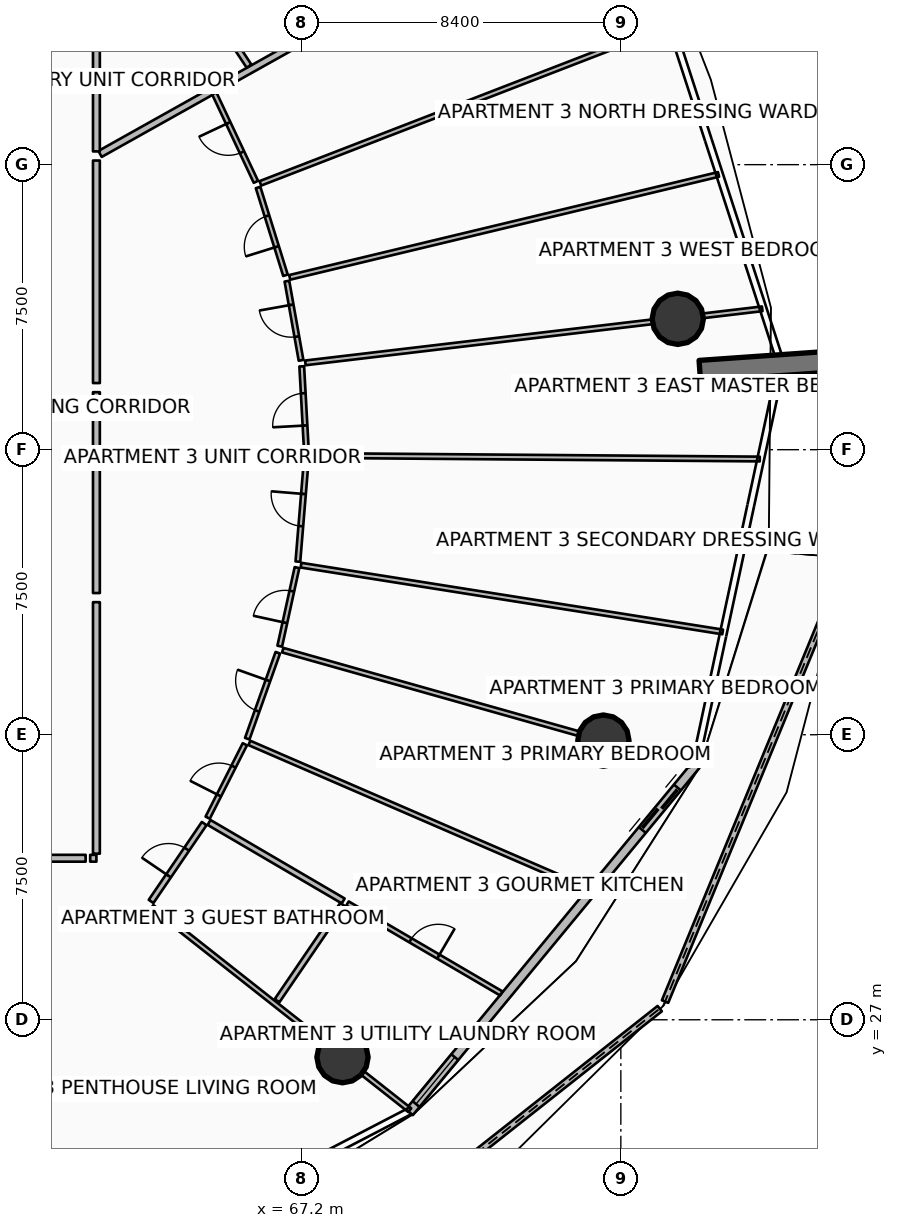
"""IFC4 building model, lengths in metres.
Left out: names, types, materials, properties, quantities, classifications, styles, units other than length and angle.
Written with IfcOpenShell. Run it as: python <this file> out.ifc"""

import sys

from ifc_helpers import new_model, si_unit, direction, frame, frame_2d, origin, origin_2d, place, context, subcontext, project, spatial, polyline, rectangle, circle, outline, extrude, element, fill, save


model = new_model("IFC4")
c1 = context("Model", 3, precision=1e-05, world=origin(), true_north=direction((0.0, 1.0)))
c2 = subcontext(c1, "Body", "Model", "MODEL_VIEW")
j1 = project(units=[si_unit("LENGTHUNIT", "METRE"), si_unit("PLANEANGLEUNIT", "RADIAN")], contexts=[c1])
p1 = place(None, origin())
s1 = spatial("IfcSite", under=j1, at=p1, CompositionType="ELEMENT")
p2 = place(p1, origin())
s2 = spatial("IfcBuilding", under=s1, at=p2, CompositionType="ELEMENT")
p3 = place(p2, frame((0.0, 0.0, 63.9)))
s3 = spatial("IfcBuildingStorey", under=s2, at=p3, CompositionType="ELEMENT", Elevation=63.9)
p4 = place(p3, frame((77.678, 44.075, 0.0), z_axis=(0.0, 0.0, 1.0), x_axis=(0.997564163539, 0.069754853754, 0.0)))
e1 = element("IfcWall", 1, at=p4, inside=s3, PredefinedType="SOLIDWALL", context=c2, shape_type="SweptSolid", body=[
    extrude(rectangle(XDim=3.5, YDim=0.55, at=frame_2d((1.75, 0.0))), origin(), (0.0, 0.0, 1.0), 3.75),
])
for number, where, z_axis, x_axis in (
    (2, (68.276, 26.016, 0.0), (0.0, 0.0, 1.0), (1.0, 0.0, 0.0)),
    (3, (75.141, 34.345, 0.0), (0.0, 0.0, 1.0), (1.0, 0.0, 0.0)),
    (4, (77.098, 45.444, 0.0), (0.0, 0.0, 1.0), (1.0, 0.0, 0.0)),
):
    element("IfcColumn", number, at=place(p3, frame(where, z_axis=z_axis, x_axis=x_axis)), inside=s3, PredefinedType="COLUMN", context=c2, shape_type="SweptSolid", body=[
        extrude(circle(Radius=0.675, at=origin_2d()), origin(), (0.0, 0.0, 1.0), 3.5),
    ])
p5 = place(p3, frame((67.172, 19.829, 0.0), z_axis=(0.0, 0.0, 1.0), x_axis=(0.784771193171, 0.619785587416, 0.0)))
e5 = element("IfcWall", 5, at=p5, inside=s3, PredefinedType="PARAPET", context=c2, shape_type="SweptSolid", body=[
    extrude(outline(polyline([(0.0, 0.0), (12.044, 0.0), (12.044, 1.832), (6.022, 1.853), (0.0, 1.756), (0.0, 0.0)])), frame((0.0, 0.09, 0.0), z_axis=(0.0, -1.0, 0.0), x_axis=(1.0, 0.0, 0.0)), (0.0, 0.0, 1.0), 0.18),
])
p6 = place(p3, frame((76.763, 27.479, 0.0), z_axis=(0.0, 0.0, 1.0), x_axis=(0.381082407016, 0.924541074838, 0.0)))
e6 = element("IfcWall", 6, at=p6, inside=s3, PredefinedType="PARAPET", context=c2, shape_type="SweptSolid", body=[
    extrude(outline(polyline([(0.0, 0.0), (12.625, 0.0), (12.625, 1.497), (6.312, 1.696), (0.0, 1.832), (0.0, 0.0)])), frame((0.0, 0.09, 0.0), z_axis=(0.0, -1.0, 0.0), x_axis=(1.0, 0.0, 0.0)), (0.0, 0.0, 1.0), 0.18),
])
p7 = place(p3, frame((70.033, 24.567, 0.0), z_axis=(0.0, 0.0, 1.0), x_axis=(0.636674332663, 0.771132799281, 0.0)))
e7 = element("IfcWall", 7, at=p7, inside=s3, PredefinedType="SOLIDWALL", context=c2, shape_type="SweptSolid", body=[
    extrude(rectangle(XDim=11.851, YDim=0.24, at=frame_2d((5.926, 0.0))), origin(), (0.0, 0.0, 1.0), 2.45),
])
p8 = place(p7, frame((9.631, 0.0, 0.0)))
e8 = element("IfcOpeningElement", 8, at=p8, cuts=e7, PredefinedType="OPENING", context=c2, shape_type="SweptSolid", body=[
    extrude(rectangle(XDim=1.45, YDim=2.15, at=frame_2d((0.725, 1.075))), frame((0.0, 0.13, 0.0), z_axis=(0.0, -1.0, 0.0), x_axis=(1.0, 0.0, 0.0)), (0.0, 0.0, 1.0), 0.26),
])
p9 = place(p7, frame((0.28, 0.0, 0.65)))
e9 = element("IfcOpeningElement", 9, at=p9, cuts=e7, PredefinedType="OPENING", context=c2, shape_type="SweptSolid", body=[
    extrude(rectangle(XDim=1.6, YDim=1.5, at=frame_2d((0.8, 0.75))), frame((0.0, 0.13, 0.0), z_axis=(0.0, -1.0, 0.0), x_axis=(1.0, 0.0, 0.0)), (0.0, 0.0, 1.0), 0.26),
])
p10 = place(p3, frame((61.896, 49.782, 0.0), z_axis=(0.0, 0.0, 1.0), x_axis=(0.872493215695, 0.488626225828, 0.0)))
e10 = element("IfcWall", 10, at=p10, inside=s3, PredefinedType="PARTITIONING", context=c2, shape_type="SweptSolid", body=[
    extrude(rectangle(XDim=15.612, YDim=0.18, at=frame_2d((7.806, 0.0))), origin(), (0.0, 0.0, 1.0), 2.867),
])
p11 = place(p3, frame((54.14, 31.25, 0.0), z_axis=(0.0, 0.0, 1.0), x_axis=(1.0, 0.0, 0.0)))
e11 = element("IfcWall", 11, at=p11, inside=s3, PredefinedType="PARTITIONING", context=c2, shape_type="SweptSolid", body=[
    extrude(rectangle(XDim=7.376, YDim=0.18, at=frame_2d((3.688, 0.0))), origin(), (0.0, 0.0, 1.0), 2.867),
])
p12 = place(p11, frame((3.138, 0.0, 0.0)))
e12 = element("IfcOpeningElement", 12, at=p12, cuts=e11, PredefinedType="OPENING", context=c2, shape_type="SweptSolid", body=[
    extrude(rectangle(XDim=1.1, YDim=2.1, at=frame_2d((0.55, 1.05))), frame((0.0, 0.1, 0.0), z_axis=(0.0, -1.0, 0.0), x_axis=(1.0, 0.0, 0.0)), (0.0, 0.0, 1.0), 0.2),
])
p13 = place(p3, frame((61.636, 31.25, 0.0), z_axis=(0.0, 0.0, 1.0), x_axis=(1.0, 0.0, 0.0)))
e13 = element("IfcWall", 13, at=p13, inside=s3, PredefinedType="PARTITIONING", context=c2, shape_type="SweptSolid", body=[
    extrude(rectangle(XDim=0.164, YDim=0.18, at=frame_2d((0.082, 0.0))), origin(), (0.0, 0.0, 1.0), 2.867),
])
p14 = place(p3, frame((61.8, 31.37, 0.0), z_axis=(0.0, 0.0, 1.0), x_axis=(0.0, 1.0, 0.0)))
e14 = element("IfcWall", 14, at=p14, inside=s3, PredefinedType="PARTITIONING", context=c2, shape_type="SweptSolid", body=[
    extrude(rectangle(XDim=6.618, YDim=0.18, at=frame_2d((3.309, 0.0))), origin(), (0.0, 0.0, 1.0), 2.867),
])
p15 = place(p3, frame((63.261, 29.969, 0.0), z_axis=(0.0, 0.0, 1.0), x_axis=(0.78531804627, -0.619092534443, 0.0)))
e15 = element("IfcWall", 15, at=p15, inside=s3, PredefinedType="PARTITIONING", context=c2, shape_type="SweptSolid", body=[
    extrude(rectangle(XDim=8.639, YDim=0.125, at=frame_2d((4.32, 0.0))), origin(), (0.0, 0.0, 1.0), 2.867),
])
p16 = place(p3, frame((63.239, 30.114, 0.0), z_axis=(0.0, 0.0, 1.0), x_axis=(0.563437614894, 0.826158613174, 0.0)))
e16 = element("IfcWall", 16, at=p16, inside=s3, PredefinedType="PARTITIONING", context=c2, shape_type="SweptSolid", body=[
    extrude(rectangle(XDim=2.48, YDim=0.15, at=frame_2d((1.24, 0.0))), origin(), (0.0, 0.0, 1.0), 2.867),
])
p17 = place(p16, frame((0.815, 0.0, 0.0)))
e17 = element("IfcOpeningElement", 17, at=p17, cuts=e16, PredefinedType="OPENING", context=c2, shape_type="SweptSolid", body=[
    extrude(rectangle(XDim=0.85, YDim=2.06, at=frame_2d((0.425, 1.03))), frame((0.0, 0.085, 0.0), z_axis=(0.0, -1.0, 0.0), x_axis=(1.0, 0.0, 0.0)), (0.0, 0.0, 1.0), 0.17),
])
p18 = place(p3, frame((66.553, 27.501, 0.0), z_axis=(0.0, 0.0, 1.0), x_axis=(0.563388764178, 0.826191927095, 0.0)))
e18 = element("IfcWall", 18, at=p18, inside=s3, PredefinedType="PARTITIONING", context=c2, shape_type="SweptSolid", body=[
    extrude(rectangle(XDim=3.063, YDim=0.15, at=frame_2d((1.531, 0.0))), origin(), (0.0, 0.0, 1.0), 2.867),
])
p19 = place(p3, frame((64.765, 32.192, 0.0), z_axis=(0.0, 0.0, 1.0), x_axis=(0.863128698129, -0.504984010109, 0.0)))
e19 = element("IfcWall", 19, at=p19, inside=s3, PredefinedType="PARTITIONING", context=c2, shape_type="SweptSolid", body=[
    extrude(rectangle(XDim=4.09, YDim=0.15, at=frame_2d((2.045, 0.0))), origin(), (0.0, 0.0, 1.0), 2.94),
])
p20 = place(p3, frame((68.407, 30.061, 0.0), z_axis=(0.0, 0.0, 1.0), x_axis=(0.863132370473, -0.504977733214, 0.0)))
e20 = element("IfcWall", 20, at=p20, inside=s3, PredefinedType="PARTITIONING", context=c2, shape_type="SweptSolid", body=[
    extrude(rectangle(XDim=4.689, YDim=0.125, at=frame_2d((2.345, 0.0))), origin(), (0.0, 0.0, 1.0), 2.94),
])
p21 = place(p20, frame((1.919, 0.0, 0.0)))
e21 = element("IfcOpeningElement", 21, at=p21, cuts=e20, PredefinedType="OPENING", context=c2, shape_type="SweptSolid", body=[
    extrude(rectangle(XDim=0.85, YDim=2.06, at=frame_2d((0.425, 1.03))), frame((0.0, 0.073, 0.0), z_axis=(0.0, -1.0, 0.0), x_axis=(1.0, 0.0, 0.0)), (0.0, 0.0, 1.0), 0.145),
])
p22 = place(p3, frame((65.825, 34.285, 0.0), z_axis=(0.0, 0.0, 1.0), x_axis=(0.917721842762, -0.39722363892, 0.0)))
e22 = element("IfcWall", 22, at=p22, inside=s3, PredefinedType="PARTITIONING", context=c2, shape_type="SweptSolid", body=[
    extrude(rectangle(XDim=9.694, YDim=0.125, at=frame_2d((4.847, 0.0))), origin(), (0.0, 0.0, 1.0), 2.94),
])
p23 = place(p3, frame((64.728, 32.317, 0.0), z_axis=(0.0, 0.0, 1.0), x_axis=(0.451897802863, 0.892069714634, 0.0)))
e23 = element("IfcWall", 23, at=p23, inside=s3, PredefinedType="PARTITIONING", context=c2, shape_type="SweptSolid", body=[
    extrude(rectangle(XDim=2.165, YDim=0.125, at=frame_2d((1.083, 0.0))), origin(), (0.0, 0.0, 1.0), 2.94),
])
p24 = place(p23, frame((0.658, 0.0, 0.0)))
e24 = element("IfcOpeningElement", 24, at=p24, cuts=e23, PredefinedType="OPENING", context=c2, shape_type="SweptSolid", body=[
    extrude(rectangle(XDim=0.85, YDim=2.06, at=frame_2d((0.425, 1.03))), frame((0.0, 0.073, 0.0), z_axis=(0.0, -1.0, 0.0), x_axis=(1.0, 0.0, 0.0)), (0.0, 0.0, 1.0), 0.145),
])
p25 = place(p3, frame((65.769, 34.396, 0.0), z_axis=(0.0, 0.0, 1.0), x_axis=(0.335079884685, 0.942189721277, 0.0)))
e25 = element("IfcWall", 25, at=p25, inside=s3, PredefinedType="PARTITIONING", context=c2, shape_type="SweptSolid", body=[
    extrude(rectangle(XDim=2.401, YDim=0.125, at=frame_2d((1.2, 0.0))), origin(), (0.0, 0.0, 1.0), 2.867),
])
p26 = place(p25, frame((0.775, 0.0, 0.0)))
e26 = element("IfcOpeningElement", 26, at=p26, cuts=e25, PredefinedType="OPENING", context=c2, shape_type="SweptSolid", body=[
    extrude(rectangle(XDim=0.85, YDim=2.06, at=frame_2d((0.425, 1.03))), frame((0.0, 0.073, 0.0), z_axis=(0.0, -1.0, 0.0), x_axis=(1.0, 0.0, 0.0)), (0.0, 0.0, 1.0), 0.145),
])
p27 = place(p3, frame((61.8, 38.228, 0.0), z_axis=(0.0, 0.0, 1.0), x_axis=(0.0, 1.0, 0.0)))
e27 = element("IfcWall", 27, at=p27, inside=s3, PredefinedType="PARTITIONING", context=c2, shape_type="SweptSolid", body=[
    extrude(rectangle(XDim=5.285, YDim=0.18, at=frame_2d((2.643, 0.0))), origin(), (0.0, 0.0, 1.0), 2.867),
])
p28 = place(p3, frame((66.703, 36.725, 0.0), z_axis=(0.0, 0.0, 1.0), x_axis=(0.962456868727, -0.271434662195, 0.0)))
e28 = element("IfcWall", 28, at=p28, inside=s3, PredefinedType="PARTITIONING", context=c2, shape_type="SweptSolid", body=[
    extrude(rectangle(XDim=11.141, YDim=0.125, at=frame_2d((5.571, 0.0))), origin(), (0.0, 0.0, 1.0), 2.867),
])
p29 = place(p3, frame((67.184, 38.962, 0.0), z_axis=(0.0, 0.0, 1.0), x_axis=(0.987685842404, -0.156450237182, 0.0)))
e29 = element("IfcWall", 29, at=p29, inside=s3, PredefinedType="PARTITIONING", context=c2, shape_type="SweptSolid", body=[
    extrude(rectangle(XDim=11.234, YDim=0.125, at=frame_2d((5.617, 0.0))), origin(), (0.0, 0.0, 1.0), 2.94),
])
p30 = place(p3, frame((67.422, 41.847, 0.0), z_axis=(0.0, 0.0, 1.0), x_axis=(0.999969106173, -0.007860451618, 0.0)))
e30 = element("IfcWall", 30, at=p30, inside=s3, PredefinedType="PARTITIONING", context=c2, shape_type="SweptSolid", body=[
    extrude(rectangle(XDim=11.833, YDim=0.125, at=frame_2d((5.917, 0.0))), origin(), (0.0, 0.0, 1.0), 2.94),
])
p31 = place(p3, frame((66.624, 36.83, 0.0), z_axis=(0.0, 0.0, 1.0), x_axis=(0.214316036982, 0.976764370917, 0.0)))
e31 = element("IfcWall", 31, at=p31, inside=s3, PredefinedType="PARTITIONING", context=c2, shape_type="SweptSolid", body=[
    extrude(rectangle(XDim=2.116, YDim=0.125, at=frame_2d((1.058, 0.0))), origin(), (0.0, 0.0, 1.0), 2.867),
])
p32 = place(p31, frame((0.633, 0.0, 0.0)))
e32 = element("IfcOpeningElement", 32, at=p32, cuts=e31, PredefinedType="OPENING", context=c2, shape_type="SweptSolid", body=[
    extrude(rectangle(XDim=0.85, YDim=2.06, at=frame_2d((0.425, 1.03))), frame((0.0, 0.073, 0.0), z_axis=(0.0, -1.0, 0.0), x_axis=(1.0, 0.0, 0.0)), (0.0, 0.0, 1.0), 0.145),
])
p33 = place(p3, frame((67.102, 39.055, 0.0), z_axis=(0.0, 0.0, 1.0), x_axis=(0.082325550285, 0.996605490538, 0.0)))
e33 = element("IfcWall", 33, at=p33, inside=s3, PredefinedType="PARTITIONING", context=c2, shape_type="SweptSolid", body=[
    extrude(rectangle(XDim=2.722, YDim=0.125, at=frame_2d((1.361, 0.0))), origin(), (0.0, 0.0, 1.0), 2.94),
])
p34 = place(p33, frame((0.936, 0.0, 0.0)))
e34 = element("IfcOpeningElement", 34, at=p34, cuts=e33, PredefinedType="OPENING", context=c2, shape_type="SweptSolid", body=[
    extrude(rectangle(XDim=0.85, YDim=2.06, at=frame_2d((0.425, 1.03))), frame((0.0, 0.073, 0.0), z_axis=(0.0, -1.0, 0.0), x_axis=(1.0, 0.0, 0.0)), (0.0, 0.0, 1.0), 0.145),
])
p35 = place(p3, frame((67.328, 41.928, 0.0), z_axis=(0.0, 0.0, 1.0), x_axis=(-0.054903584575, 0.998491660657, 0.0)))
e35 = element("IfcWall", 35, at=p35, inside=s3, PredefinedType="PARTITIONING", context=c2, shape_type="SweptSolid", body=[
    extrude(rectangle(XDim=2.268, YDim=0.125, at=frame_2d((1.134, 0.0))), origin(), (0.0, 0.0, 1.0), 2.867),
])
p36 = place(p35, frame((0.709, 0.0, 0.0)))
e36 = element("IfcOpeningElement", 36, at=p36, cuts=e35, PredefinedType="OPENING", context=c2, shape_type="SweptSolid", body=[
    extrude(rectangle(XDim=0.85, YDim=2.06, at=frame_2d((0.425, 1.03))), frame((0.0, 0.073, 0.0), z_axis=(0.0, -1.0, 0.0), x_axis=(1.0, 0.0, 0.0)), (0.0, 0.0, 1.0), 0.145),
])
p37 = place(p3, frame((61.8, 43.753, 0.0), z_axis=(0.0, 0.0, 1.0), x_axis=(0.0, 1.0, 0.0)))
e37 = element("IfcWall", 37, at=p37, inside=s3, PredefinedType="PARTITIONING", context=c2, shape_type="SweptSolid", body=[
    extrude(rectangle(XDim=5.855, YDim=0.18, at=frame_2d((2.927, 0.0))), origin(), (0.0, 0.0, 1.0), 2.867),
])
p38 = place(p3, frame((67.298, 44.284, 0.0), z_axis=(0.0, 0.0, 1.0), x_axis=(0.993068589749, 0.117536275483, 0.0)))
e38 = element("IfcWall", 38, at=p38, inside=s3, PredefinedType="PARTITIONING", context=c2, shape_type="SweptSolid", body=[
    extrude(rectangle(XDim=12.106, YDim=0.125, at=frame_2d((6.053, 0.0))), origin(), (0.0, 0.0, 1.0), 2.867),
])
p39 = place(p3, frame((66.886, 46.534, 0.0), z_axis=(0.0, 0.0, 1.0), x_axis=(0.972368393799, 0.233451722507, 0.0)))
e39 = element("IfcWall", 39, at=p39, inside=s3, PredefinedType="PARTITIONING", context=c2, shape_type="SweptSolid", body=[
    extrude(rectangle(XDim=11.605, YDim=0.125, at=frame_2d((5.802, 0.0))), origin(), (0.0, 0.0, 1.0), 2.94),
])
p40 = place(p3, frame((66.115, 49.008, 0.0), z_axis=(0.0, 0.0, 1.0), x_axis=(0.932641955578, 0.360803246514, 0.0)))
e40 = element("IfcWall", 40, at=p40, inside=s3, PredefinedType="PARTITIONING", context=c2, shape_type="SweptSolid", body=[
    extrude(rectangle(XDim=11.556, YDim=0.125, at=frame_2d((5.778, 0.0))), origin(), (0.0, 0.0, 1.0), 2.94),
])
p41 = place(p3, frame((67.185, 44.351, 0.0), z_axis=(0.0, 0.0, 1.0), x_axis=(-0.175726743029, 0.984438983271, 0.0)))
e41 = element("IfcWall", 41, at=p41, inside=s3, PredefinedType="PARTITIONING", context=c2, shape_type="SweptSolid", body=[
    extrude(rectangle(XDim=2.116, YDim=0.125, at=frame_2d((1.058, 0.0))), origin(), (0.0, 0.0, 1.0), 2.867),
])
p42 = place(p41, frame((0.633, 0.0, 0.0)))
e42 = element("IfcOpeningElement", 42, at=p42, cuts=e41, PredefinedType="OPENING", context=c2, shape_type="SweptSolid", body=[
    extrude(rectangle(XDim=0.85, YDim=2.06, at=frame_2d((0.425, 1.03))), frame((0.0, 0.073, 0.0), z_axis=(0.0, -1.0, 0.0), x_axis=(1.0, 0.0, 0.0)), (0.0, 0.0, 1.0), 0.145),
])
p43 = place(p3, frame((66.775, 46.59, 0.0), z_axis=(0.0, 0.0, 1.0), x_axis=(-0.297792299564, 0.954630685826, 0.0)))
e43 = element("IfcWall", 43, at=p43, inside=s3, PredefinedType="PARTITIONING", context=c2, shape_type="SweptSolid", body=[
    extrude(rectangle(XDim=2.419, YDim=0.125, at=frame_2d((1.21, 0.0))), origin(), (0.0, 0.0, 1.0), 2.94),
])
p44 = place(p43, frame((0.785, 0.0, 0.0)))
e44 = element("IfcOpeningElement", 44, at=p44, cuts=e43, PredefinedType="OPENING", context=c2, shape_type="SweptSolid", body=[
    extrude(rectangle(XDim=0.85, YDim=2.06, at=frame_2d((0.425, 1.03))), frame((0.0, 0.073, 0.0), z_axis=(0.0, -1.0, 0.0), x_axis=(1.0, 0.0, 0.0)), (0.0, 0.0, 1.0), 0.145),
])
p45 = place(p3, frame((65.997, 49.048, 0.0), z_axis=(0.0, 0.0, 1.0), x_axis=(-0.425774166793, 0.904829463983, 0.0)))
e45 = element("IfcWall", 45, at=p45, inside=s3, PredefinedType="PARTITIONING", context=c2, shape_type="SweptSolid", body=[
    extrude(rectangle(XDim=2.571, YDim=0.125, at=frame_2d((1.285, 0.0))), origin(), (0.0, 0.0, 1.0), 2.867),
])
p46 = place(p45, frame((0.86, 0.0, 0.0)))
e46 = element("IfcOpeningElement", 46, at=p46, cuts=e45, PredefinedType="OPENING", context=c2, shape_type="SweptSolid", body=[
    extrude(rectangle(XDim=0.85, YDim=2.06, at=frame_2d((0.425, 1.03))), frame((0.0, 0.073, 0.0), z_axis=(0.0, -1.0, 0.0), x_axis=(1.0, 0.0, 0.0)), (0.0, 0.0, 1.0), 0.145),
])
p47 = place(p3, frame((61.8, 49.848, 0.0), z_axis=(0.0, 0.0, 1.0), x_axis=(0.0, 1.0, 0.0)))
e47 = element("IfcWall", 47, at=p47, inside=s3, PredefinedType="PARTITIONING", context=c2, shape_type="SweptSolid", body=[
    extrude(rectangle(XDim=2.781, YDim=0.18, at=frame_2d((1.391, 0.0))), origin(), (0.0, 0.0, 1.0), 2.867),
])
p48 = place(p3, frame((65.816, 52.092, 0.0), z_axis=(0.0, 0.0, 1.0), x_axis=(-0.550532146696, 0.834813964578, 0.0)))
e48 = element("IfcWall", 48, at=p48, inside=s3, PredefinedType="PARTITIONING", context=c2, shape_type="SweptSolid", body=[
    extrude(rectangle(XDim=2.776, YDim=0.15, at=frame_2d((1.388, 0.0))), origin(), (0.0, 0.0, 1.0), 2.867),
])
p49 = place(p48, frame((0.963, 0.0, 0.0)))
e49 = element("IfcOpeningElement", 49, at=p49, cuts=e48, PredefinedType="OPENING", context=c2, shape_type="SweptSolid", body=[
    extrude(rectangle(XDim=0.85, YDim=2.06, at=frame_2d((0.425, 1.03))), frame((0.0, 0.085, 0.0), z_axis=(0.0, -1.0, 0.0), x_axis=(1.0, 0.0, 0.0)), (0.0, 0.0, 1.0), 0.17),
])
p50 = place(p8, origin())
e50 = element("IfcDoor", 50, at=p50, inside=s3, OperationType="DOUBLE_DOOR_SLIDING", PredefinedType="DOOR", context=c2, shape_type="SweptSolid", body=[
    extrude(rectangle(XDim=1.45, YDim=2.15, at=frame_2d((0.725, 1.075))), frame((0.0, 0.025, 0.0), z_axis=(0.0, -1.0, 0.0), x_axis=(1.0, 0.0, 0.0)), (0.0, 0.0, 1.0), 0.05),
])
fill(e8, e50)
p51 = place(p9, origin())
e51 = element("IfcWindow", 51, at=p51, inside=s3, PartitioningType="SINGLE_PANEL", PredefinedType="WINDOW", context=c2, shape_type="SweptSolid", body=[
    extrude(rectangle(XDim=1.6, YDim=1.5, at=frame_2d((0.8, 0.75))), frame((0.0, 0.03, 0.0), z_axis=(0.0, -1.0, 0.0), x_axis=(1.0, 0.0, 0.0)), (0.0, 0.0, 1.0), 0.06),
])
fill(e9, e51)
p52 = place(p17, origin())
e52 = element("IfcDoor", 52, at=p52, inside=s3, OperationType="SINGLE_SWING_LEFT", PredefinedType="DOOR", context=c2, shape_type="SweptSolid", body=[
    extrude(rectangle(XDim=0.85, YDim=2.06, at=frame_2d((0.425, 1.03))), frame((0.0, 0.025, 0.0), z_axis=(0.0, -1.0, 0.0), x_axis=(1.0, 0.0, 0.0)), (0.0, 0.0, 1.0), 0.05),
])
fill(e17, e52)
p53 = place(p21, origin())
e53 = element("IfcDoor", 53, at=p53, inside=s3, OperationType="SINGLE_SWING_RIGHT", PredefinedType="DOOR", context=c2, shape_type="SweptSolid", body=[
    extrude(rectangle(XDim=0.85, YDim=2.06, at=frame_2d((0.425, 1.03))), frame((0.0, 0.025, 0.0), z_axis=(0.0, -1.0, 0.0), x_axis=(1.0, 0.0, 0.0)), (0.0, 0.0, 1.0), 0.05),
])
fill(e21, e53)
p54 = place(p24, origin())
e54 = element("IfcDoor", 54, at=p54, inside=s3, OperationType="SINGLE_SWING_LEFT", PredefinedType="DOOR", context=c2, shape_type="SweptSolid", body=[
    extrude(rectangle(XDim=0.85, YDim=2.06, at=frame_2d((0.425, 1.03))), frame((0.0, 0.025, 0.0), z_axis=(0.0, -1.0, 0.0), x_axis=(1.0, 0.0, 0.0)), (0.0, 0.0, 1.0), 0.05),
])
fill(e24, e54)
p55 = place(p26, origin())
e55 = element("IfcDoor", 55, at=p55, inside=s3, OperationType="SINGLE_SWING_RIGHT", PredefinedType="DOOR", context=c2, shape_type="SweptSolid", body=[
    extrude(rectangle(XDim=0.85, YDim=2.06, at=frame_2d((0.425, 1.03))), frame((0.0, 0.025, 0.0), z_axis=(0.0, -1.0, 0.0), x_axis=(1.0, 0.0, 0.0)), (0.0, 0.0, 1.0), 0.05),
])
fill(e26, e55)
p56 = place(p32, origin())
e56 = element("IfcDoor", 56, at=p56, inside=s3, OperationType="SINGLE_SWING_LEFT", PredefinedType="DOOR", context=c2, shape_type="SweptSolid", body=[
    extrude(rectangle(XDim=0.85, YDim=2.06, at=frame_2d((0.425, 1.03))), frame((0.0, 0.025, 0.0), z_axis=(0.0, -1.0, 0.0), x_axis=(1.0, 0.0, 0.0)), (0.0, 0.0, 1.0), 0.05),
])
fill(e32, e56)
p57 = place(p34, origin())
e57 = element("IfcDoor", 57, at=p57, inside=s3, OperationType="SINGLE_SWING_RIGHT", PredefinedType="DOOR", context=c2, shape_type="SweptSolid", body=[
    extrude(rectangle(XDim=0.85, YDim=2.06, at=frame_2d((0.425, 1.03))), frame((0.0, 0.025, 0.0), z_axis=(0.0, -1.0, 0.0), x_axis=(1.0, 0.0, 0.0)), (0.0, 0.0, 1.0), 0.05),
])
fill(e34, e57)
p58 = place(p36, origin())
e58 = element("IfcDoor", 58, at=p58, inside=s3, OperationType="SINGLE_SWING_LEFT", PredefinedType="DOOR", context=c2, shape_type="SweptSolid", body=[
    extrude(rectangle(XDim=0.85, YDim=2.06, at=frame_2d((0.425, 1.03))), frame((0.0, 0.025, 0.0), z_axis=(0.0, -1.0, 0.0), x_axis=(1.0, 0.0, 0.0)), (0.0, 0.0, 1.0), 0.05),
])
fill(e36, e58)
p59 = place(p42, origin())
e59 = element("IfcDoor", 59, at=p59, inside=s3, OperationType="SINGLE_SWING_RIGHT", PredefinedType="DOOR", context=c2, shape_type="SweptSolid", body=[
    extrude(rectangle(XDim=0.85, YDim=2.06, at=frame_2d((0.425, 1.03))), frame((0.0, 0.025, 0.0), z_axis=(0.0, -1.0, 0.0), x_axis=(1.0, 0.0, 0.0)), (0.0, 0.0, 1.0), 0.05),
])
fill(e42, e59)
p60 = place(p44, origin())
e60 = element("IfcDoor", 60, at=p60, inside=s3, OperationType="SINGLE_SWING_LEFT", PredefinedType="DOOR", context=c2, shape_type="SweptSolid", body=[
    extrude(rectangle(XDim=0.85, YDim=2.06, at=frame_2d((0.425, 1.03))), frame((0.0, 0.025, 0.0), z_axis=(0.0, -1.0, 0.0), x_axis=(1.0, 0.0, 0.0)), (0.0, 0.0, 1.0), 0.05),
])
fill(e44, e60)
p61 = place(p46, origin())
e61 = element("IfcDoor", 61, at=p61, inside=s3, OperationType="SINGLE_SWING_RIGHT", PredefinedType="DOOR", context=c2, shape_type="SweptSolid", body=[
    extrude(rectangle(XDim=0.85, YDim=2.06, at=frame_2d((0.425, 1.03))), frame((0.0, 0.025, 0.0), z_axis=(0.0, -1.0, 0.0), x_axis=(1.0, 0.0, 0.0)), (0.0, 0.0, 1.0), 0.05),
])
fill(e46, e61)
save(model, sys.argv[1])
